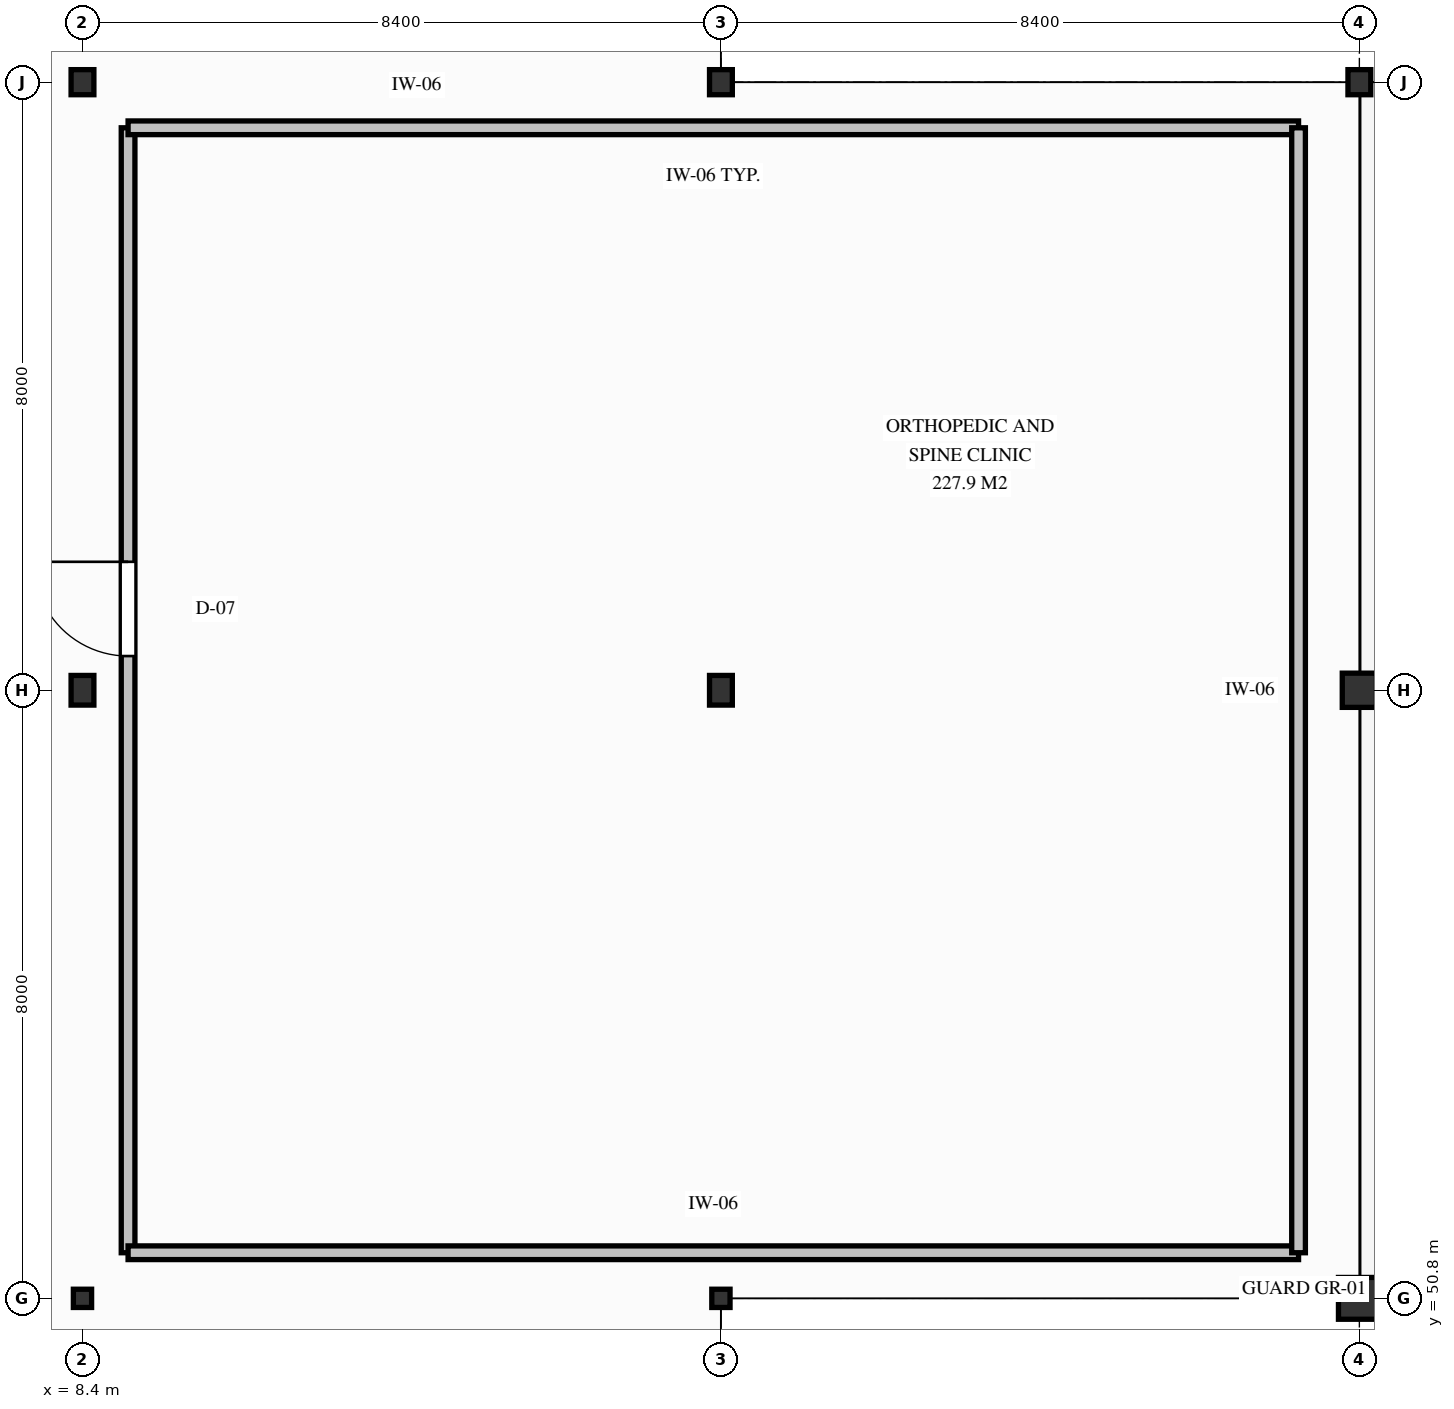
"""IFC4 building model, lengths in metres.
Left out: names, types, materials, properties, quantities, classifications, styles, units other than length and angle.
Written with IfcOpenShell. Run it as: python <this file> out.ifc"""

import sys

from ifc_helpers import new_model, si_unit, direction, frame, frame_2d, origin, origin_2d, place, context, subcontext, project, spatial, rectangle, i_section, extrude, element, fill, save


model = new_model("IFC4")
c1 = context("Model", 3, precision=1e-05, world=origin(), true_north=direction((0.0, 1.0)))
c2 = subcontext(c1, "Body", "Model", "MODEL_VIEW")
j1 = project(units=[si_unit("LENGTHUNIT", "METRE"), si_unit("PLANEANGLEUNIT", "RADIAN")], contexts=[c1])
p1 = place(None, origin())
s1 = spatial("IfcSite", under=j1, at=p1, CompositionType="ELEMENT")
p2 = place(p1, origin())
s2 = spatial("IfcBuilding", under=s1, at=p2, CompositionType="ELEMENT")
p3 = place(p2, frame((0.0, 0.0, 13.2)))
s3 = spatial("IfcBuildingStorey", under=s2, at=p3, CompositionType="ELEMENT", Elevation=13.2)
p4 = place(p3, frame((8.4, 50.8, 0.0), z_axis=(0.0, 0.0, 1.0), x_axis=(1.0, 0.0, 0.0)))
e1 = element("IfcColumn", 1, at=p4, inside=s3, PredefinedType="COLUMN", context=c2, shape_type="SweptSolid", body=[
    extrude(i_section(OverallWidth=0.24, OverallDepth=0.24, WebThickness=0.01, FlangeThickness=0.017, FilletRadius=0.021, at=origin_2d()), origin(), (0.0, 0.0, 1.0), 4.05),
])
p5 = place(p3, frame((8.4, 58.8, 0.0), z_axis=(0.0, 0.0, 1.0), x_axis=(1.0, 0.0, 0.0)))
e2 = element("IfcColumn", 2, at=p5, inside=s3, PredefinedType="COLUMN", context=c2, shape_type="SweptSolid", body=[
    extrude(i_section(OverallWidth=0.3, OverallDepth=0.39, WebThickness=0.011, FlangeThickness=0.019, FilletRadius=0.027, at=origin_2d()), origin(), (0.0, 0.0, 1.0), 4.05),
])
p6 = place(p3, frame((8.4, 66.8, 0.0), z_axis=(0.0, 0.0, 1.0), x_axis=(1.0, 0.0, 0.0)))
e3 = element("IfcColumn", 3, at=p6, inside=s3, PredefinedType="COLUMN", context=c2, shape_type="SweptSolid", body=[
    extrude(i_section(OverallWidth=0.3, OverallDepth=0.33, WebThickness=0.01, FlangeThickness=0.017, FilletRadius=0.027, at=origin_2d()), origin(), (0.0, 0.0, 1.0), 4.05),
])
p7 = place(p3, frame((16.8, 50.8, 0.0), z_axis=(0.0, 0.0, 1.0), x_axis=(1.0, 0.0, 0.0)))
e4 = element("IfcColumn", 4, at=p7, inside=s3, PredefinedType="COLUMN", context=c2, shape_type="SweptSolid", body=[
    extrude(i_section(OverallWidth=0.24, OverallDepth=0.24, WebThickness=0.01, FlangeThickness=0.017, FilletRadius=0.021, at=origin_2d()), origin(), (0.0, 0.0, 1.0), 4.05),
])
p8 = place(p3, frame((16.8, 58.8, 0.0), z_axis=(0.0, 0.0, 1.0), x_axis=(1.0, 0.0, 0.0)))
e5 = element("IfcColumn", 5, at=p8, inside=s3, PredefinedType="COLUMN", context=c2, shape_type="SweptSolid", body=[
    extrude(i_section(OverallWidth=0.3, OverallDepth=0.39, WebThickness=0.011, FlangeThickness=0.019, FilletRadius=0.027, at=origin_2d()), origin(), (0.0, 0.0, 1.0), 4.05),
])
p9 = place(p3, frame((16.8, 66.8, 0.0), z_axis=(0.0, 0.0, 1.0), x_axis=(1.0, 0.0, 0.0)))
e6 = element("IfcColumn", 6, at=p9, inside=s3, PredefinedType="COLUMN", context=c2, shape_type="SweptSolid", body=[
    extrude(i_section(OverallWidth=0.3, OverallDepth=0.33, WebThickness=0.01, FlangeThickness=0.017, FilletRadius=0.027, at=origin_2d()), origin(), (0.0, 0.0, 1.0), 4.05),
])
p10 = place(p3, frame((25.2, 50.8, 0.0), z_axis=(0.0, 0.0, 1.0), x_axis=(1.0, 0.0, 0.0)))
e7 = element("IfcColumn", 7, at=p10, inside=s3, PredefinedType="COLUMN", context=c2, shape_type="SweptSolid", body=[
    extrude(rectangle(XDim=0.55, YDim=0.55, at=origin_2d()), origin(), (0.0, 0.0, 1.0), 4.05),
])
p11 = place(p3, frame((25.2, 58.8, 0.0), z_axis=(0.0, 0.0, 1.0), x_axis=(1.0, 0.0, 0.0)))
e8 = element("IfcColumn", 8, at=p11, inside=s3, PredefinedType="COLUMN", context=c2, shape_type="SweptSolid", body=[
    extrude(rectangle(XDim=0.45, YDim=0.45, at=origin_2d()), origin(), (0.0, 0.0, 1.0), 4.05),
])
p12 = place(p3, frame((25.2, 66.8, 0.0), z_axis=(0.0, 0.0, 1.0), x_axis=(1.0, 0.0, 0.0)))
e9 = element("IfcColumn", 9, at=p12, inside=s3, PredefinedType="COLUMN", context=c2, shape_type="SweptSolid", body=[
    extrude(i_section(OverallWidth=0.3, OverallDepth=0.33, WebThickness=0.01, FlangeThickness=0.017, FilletRadius=0.027, at=origin_2d()), origin(), (0.0, 0.0, 1.0), 4.05),
])
p13 = place(p3, frame((9.0, 51.4, 0.0), z_axis=(0.0, 0.0, 1.0), x_axis=(0.0, 1.0, 0.0)))
e10 = element("IfcWall", 10, at=p13, inside=s3, PredefinedType="PARTITIONING", context=c2, shape_type="SweptSolid", body=[
    extrude(rectangle(XDim=14.8, YDim=0.18, at=frame_2d((7.4, 0.0))), origin(), (0.0, 0.0, 1.0), 3.388),
])
p14 = place(p13, frame((7.85, 0.0, 0.0)))
e11 = element("IfcOpeningElement", 11, at=p14, cuts=e10, PredefinedType="OPENING", context=c2, shape_type="SweptSolid", body=[
    extrude(rectangle(XDim=1.24, YDim=2.2, at=frame_2d((0.62, 1.1))), frame((0.0, 0.1, 0.0), z_axis=(0.0, -1.0, 0.0), x_axis=(1.0, 0.0, 0.0)), (0.0, 0.0, 1.0), 0.2),
])
p15 = place(p3, frame((9.0, 66.2, 0.0), z_axis=(0.0, 0.0, 1.0), x_axis=(1.0, 0.0, 0.0)))
e12 = element("IfcWall", 12, at=p15, inside=s3, PredefinedType="PARTITIONING", context=c2, shape_type="SweptSolid", body=[
    extrude(rectangle(XDim=15.4, YDim=0.18, at=frame_2d((7.7, 0.0))), origin(), (0.0, 0.0, 1.0), 3.328),
])
p16 = place(p3, frame((24.4, 51.4, 0.0), z_axis=(0.0, 0.0, 1.0), x_axis=(-1.0, 0.0, 0.0)))
e13 = element("IfcWall", 13, at=p16, inside=s3, PredefinedType="PARTITIONING", context=c2, shape_type="SweptSolid", body=[
    extrude(rectangle(XDim=15.4, YDim=0.18, at=frame_2d((7.7, 0.0))), origin(), (0.0, 0.0, 1.0), 3.178),
])
p17 = place(p3, frame((24.4, 66.2, 0.0), z_axis=(0.0, 0.0, 1.0), x_axis=(0.0, -1.0, 0.0)))
e14 = element("IfcWall", 14, at=p17, inside=s3, PredefinedType="PARTITIONING", context=c2, shape_type="SweptSolid", body=[
    extrude(rectangle(XDim=14.8, YDim=0.18, at=frame_2d((7.4, 0.0))), origin(), (0.0, 0.0, 1.0), 3.448),
])
p18 = place(p14, origin())
e15 = element("IfcDoor", 15, at=p18, inside=s3, OperationType="SINGLE_SWING_RIGHT", PredefinedType="DOOR", context=c2, shape_type="SweptSolid", body=[
    extrude(rectangle(XDim=1.24, YDim=2.2, at=frame_2d((0.62, 1.1))), frame((0.0, 0.025, 0.0), z_axis=(0.0, -1.0, 0.0), x_axis=(1.0, 0.0, 0.0)), (0.0, 0.0, 1.0), 0.05),
])
fill(e11, e15)
save(model, sys.argv[1])
